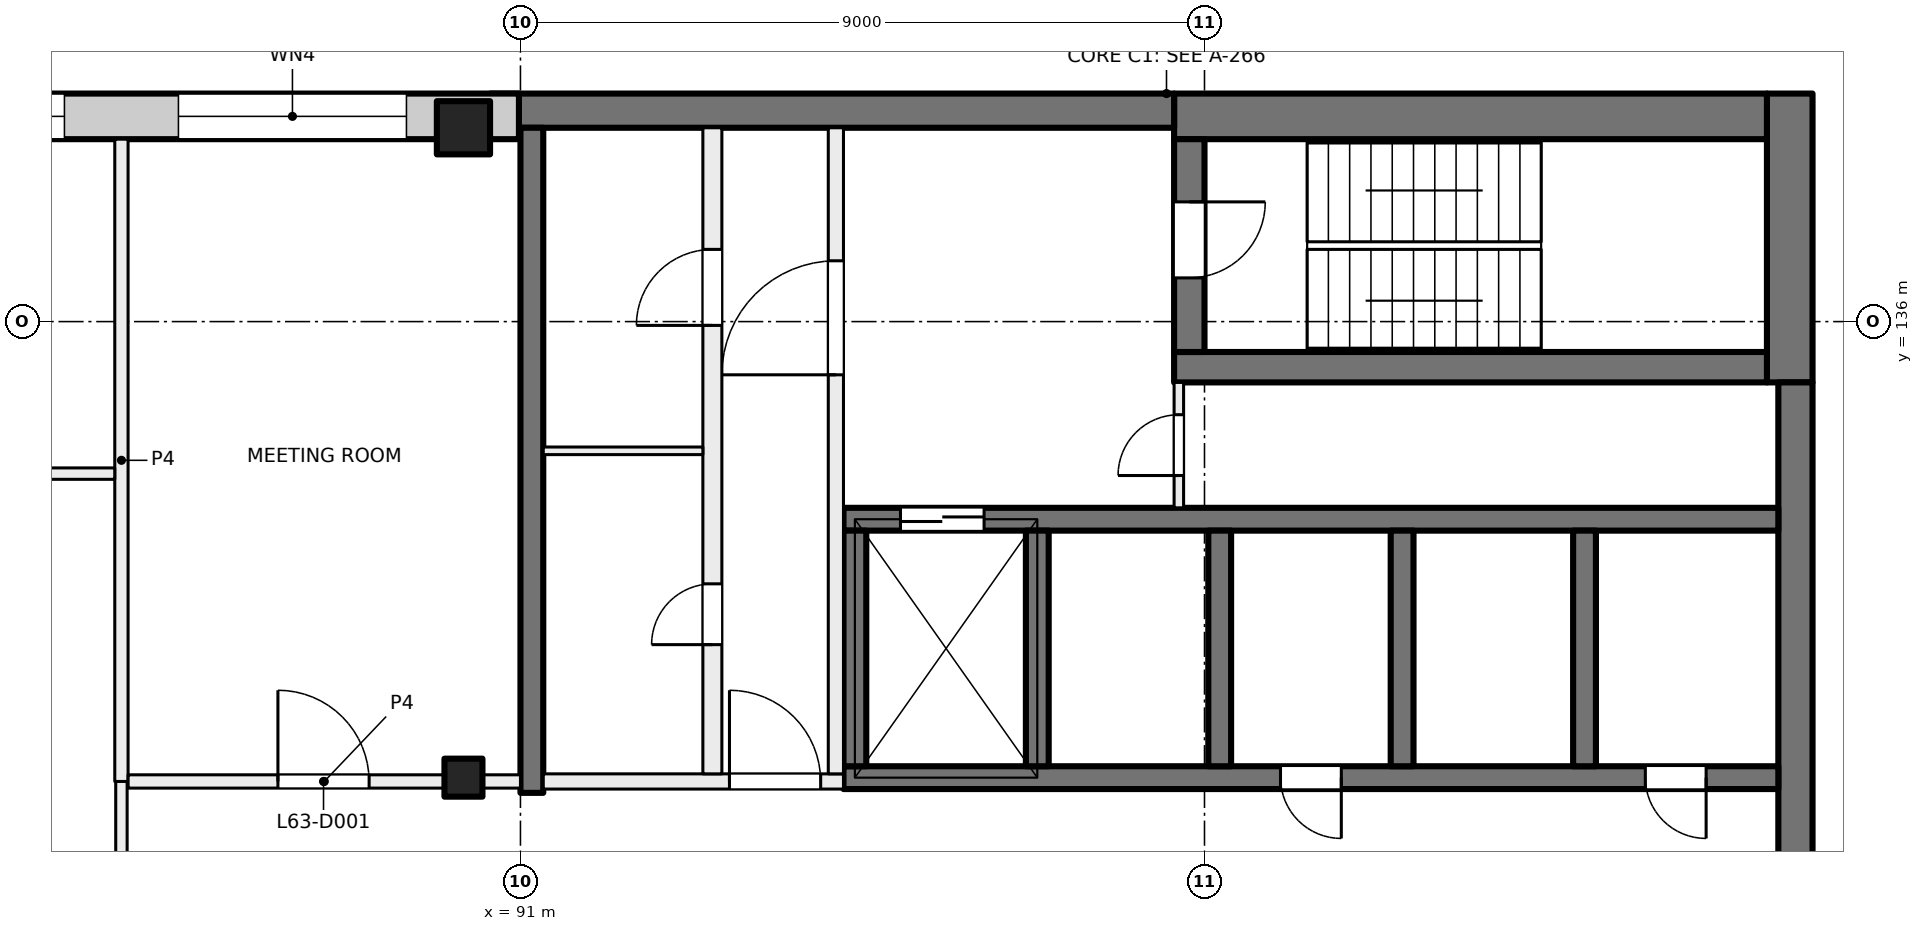
"""IFC4 building model, lengths in metres.
Left out: names, types, materials, properties, quantities, classifications, styles, units other than length and angle.
Written with IfcOpenShell. Run it as: python <this file> out.ifc"""

import sys

from ifc_helpers import new_model, si_unit, direction, frame, frame_2d, origin, origin_2d, place, context, subcontext, project, spatial, rectangle, extrude, element, fill, save


model = new_model("IFC4")
c1 = context("Model", 3, precision=1e-05, world=origin(), true_north=direction((0.0, 1.0)))
c2 = subcontext(c1, "Body", "Model", "MODEL_VIEW")
j1 = project(units=[si_unit("LENGTHUNIT", "METRE"), si_unit("PLANEANGLEUNIT", "RADIAN")], contexts=[c1])
p1 = place(None, origin())
s1 = spatial("IfcSite", under=j1, at=p1, CompositionType="ELEMENT")
p2 = place(p1, origin())
s2 = spatial("IfcBuilding", under=s1, at=p2, CompositionType="ELEMENT")
p3 = place(p2, frame((0.0, 0.0, 265.5)))
s3 = spatial("IfcBuildingStorey", under=s2, at=p3, CompositionType="ELEMENT", Elevation=265.5)
p4 = place(p3, frame((90.25, 130.0, 0.0), z_axis=(0.0, 0.0, 1.0), x_axis=(1.0, 0.0, 0.0)))
e1 = element("IfcColumn", 1, at=p4, inside=s3, PredefinedType="COLUMN", context=c2, shape_type="SweptSolid", body=[
    extrude(rectangle(XDim=0.5, YDim=0.5, at=origin_2d()), origin(), (0.0, 0.0, 1.0), 4.0),
])
p5 = place(p3, frame((90.25, 138.55, 0.0), z_axis=(0.0, 0.0, 1.0), x_axis=(1.0, 0.0, 0.0)))
e2 = element("IfcColumn", 2, at=p5, inside=s3, PredefinedType="COLUMN", context=c2, shape_type="SweptSolid", body=[
    extrude(rectangle(XDim=0.7, YDim=0.7, at=origin_2d()), origin(), (0.0, 0.0, 1.0), 4.0),
])
p6 = place(p3, frame((107.7, 139.0, 0.0), z_axis=(0.0, 0.0, 1.0), x_axis=(0.0, -1.0, 0.0)))
e3 = element("IfcWall", 3, at=p6, inside=s3, PredefinedType="SHEAR", context=c2, shape_type="SweptSolid", body=[
    extrude(rectangle(XDim=3.8, YDim=0.6, at=frame_2d((1.9, 0.0))), origin(), (0.0, 0.0, 1.0), 4.0),
])
p7 = place(p3, frame((107.775, 135.2, 0.0), z_axis=(0.0, 0.0, 1.0), x_axis=(0.0, -1.0, 0.0)))
e4 = element("IfcWall", 4, at=p7, inside=s3, PredefinedType="SHEAR", context=c2, shape_type="SweptSolid", body=[
    extrude(rectangle(XDim=14.4, YDim=0.45, at=frame_2d((7.2, 0.0))), origin(), (0.0, 0.0, 1.0), 4.0),
])
p8 = place(p3, frame((107.4, 138.7, 0.0), z_axis=(0.0, 0.0, 1.0), x_axis=(-1.0, 0.0, 0.0)))
e5 = element("IfcWall", 5, at=p8, inside=s3, PredefinedType="SHEAR", context=c2, shape_type="SweptSolid", body=[
    extrude(rectangle(XDim=7.8, YDim=0.6, at=frame_2d((3.9, 0.0))), origin(), (0.0, 0.0, 1.0), 4.0),
])
p9 = place(p3, frame((99.6, 138.775, 0.0), z_axis=(0.0, 0.0, 1.0), x_axis=(-1.0, 0.0, 0.0)))
e6 = element("IfcWall", 6, at=p9, inside=s3, PredefinedType="SHEAR", context=c2, shape_type="SweptSolid", body=[
    extrude(rectangle(XDim=9.0, YDim=0.45, at=frame_2d((4.5, 0.0))), origin(), (0.0, 0.0, 1.0), 4.0),
])
p10 = place(p3, frame((107.4, 135.4, 0.0), z_axis=(0.0, 0.0, 1.0), x_axis=(-1.0, 0.0, 0.0)))
e7 = element("IfcWall", 7, at=p10, inside=s3, PredefinedType="SHEAR", context=c2, shape_type="SweptSolid", body=[
    extrude(rectangle(XDim=7.8, YDim=0.4, at=frame_2d((3.9, 0.0))), origin(), (0.0, 0.0, 1.0), 4.0),
])
p11 = place(p3, frame((99.8, 138.4, 0.0), z_axis=(0.0, 0.0, 1.0), x_axis=(0.0, -1.0, 0.0)))
e8 = element("IfcWall", 8, at=p11, inside=s3, PredefinedType="SHEAR", context=c2, shape_type="SweptSolid", body=[
    extrude(rectangle(XDim=2.8, YDim=0.4, at=frame_2d((1.4, 0.0))), origin(), (0.0, 0.0, 1.0), 4.0),
])
p12 = place(p11, frame((0.825, 0.0, 0.0)))
e9 = element("IfcOpeningElement", 9, at=p12, cuts=e8, PredefinedType="OPENING", context=c2, shape_type="SweptSolid", body=[
    extrude(rectangle(XDim=1.0, YDim=2.1, at=frame_2d((0.5, 1.05))), frame((0.0, 0.21, 0.0), z_axis=(0.0, -1.0, 0.0), x_axis=(1.0, 0.0, 0.0)), (0.0, 0.0, 1.0), 0.42),
])
p13 = place(p3, frame((107.55, 130.0, 0.0), z_axis=(0.0, 0.0, 1.0), x_axis=(-1.0, 0.0, 0.0)))
e10 = element("IfcWall", 10, at=p13, inside=s3, PredefinedType="SHEAR", context=c2, shape_type="SweptSolid", body=[
    extrude(rectangle(XDim=12.3, YDim=0.3, at=frame_2d((6.15, 0.0))), origin(), (0.0, 0.0, 1.0), 4.0),
])
p14 = place(p13, frame((0.95, 0.0, 0.0)))
e11 = element("IfcOpeningElement", 11, at=p14, cuts=e10, PredefinedType="OPENING", context=c2, shape_type="SweptSolid", body=[
    extrude(rectangle(XDim=0.8, YDim=2.1, at=frame_2d((0.4, 1.05))), frame((0.0, 0.16, 0.0), z_axis=(0.0, -1.0, 0.0), x_axis=(1.0, 0.0, 0.0)), (0.0, 0.0, 1.0), 0.32),
])
p15 = place(p13, frame((5.75, 0.0, 0.0)))
e12 = element("IfcOpeningElement", 12, at=p15, cuts=e10, PredefinedType="OPENING", context=c2, shape_type="SweptSolid", body=[
    extrude(rectangle(XDim=0.8, YDim=2.1, at=frame_2d((0.4, 1.05))), frame((0.0, 0.16, 0.0), z_axis=(0.0, -1.0, 0.0), x_axis=(1.0, 0.0, 0.0)), (0.0, 0.0, 1.0), 0.32),
])
p16 = place(p3, frame((107.55, 133.4, 0.0), z_axis=(0.0, 0.0, 1.0), x_axis=(-1.0, 0.0, 0.0)))
e13 = element("IfcWall", 13, at=p16, inside=s3, PredefinedType="SHEAR", context=c2, shape_type="SweptSolid", body=[
    extrude(rectangle(XDim=12.3, YDim=0.3, at=frame_2d((6.15, 0.0))), origin(), (0.0, 0.0, 1.0), 4.0),
])
p17 = place(p16, frame((10.45, 0.0, 0.0)))
e14 = element("IfcOpeningElement", 14, at=p17, cuts=e13, PredefinedType="OPENING", context=c2, shape_type="SweptSolid", body=[
    extrude(rectangle(XDim=1.1, YDim=2.1, at=frame_2d((0.55, 1.05))), frame((0.0, 0.16, 0.0), z_axis=(0.0, -1.0, 0.0), x_axis=(1.0, 0.0, 0.0)), (0.0, 0.0, 1.0), 0.32),
])
for number, where, z_axis, x_axis in (
    (15, (105.0, 133.25, 0.0), (0.0, 0.0, 1.0), (0.0, -1.0, 0.0)),
    (16, (102.6, 133.25, 0.0), (0.0, 0.0, 1.0), (0.0, -1.0, 0.0)),
    (17, (100.2, 133.25, 0.0), (0.0, 0.0, 1.0), (0.0, -1.0, 0.0)),
    (18, (97.8, 133.25, 0.0), (0.0, 0.0, 1.0), (0.0, -1.0, 0.0)),
    (19, (95.4, 133.25, 0.0), (0.0, 0.0, 1.0), (0.0, -1.0, 0.0)),
):
    element("IfcWall", number, at=place(p3, frame(where, z_axis=z_axis, x_axis=x_axis)), inside=s3, PredefinedType="SHEAR", context=c2, shape_type="SweptSolid", body=[
        extrude(rectangle(XDim=3.1, YDim=0.3, at=frame_2d((1.55, 0.0))), origin(), (0.0, 0.0, 1.0), 4.0),
    ])
p18 = place(p3, frame((91.15, 138.55, 0.0), z_axis=(0.0, 0.0, 1.0), x_axis=(0.0, -1.0, 0.0)))
e20 = element("IfcWall", 20, at=p18, inside=s3, PredefinedType="SHEAR", context=c2, shape_type="SweptSolid", body=[
    extrude(rectangle(XDim=8.75, YDim=0.3, at=frame_2d((4.375, 0.0))), origin(), (0.0, 0.0, 1.0), 4.0),
])
p19 = place(p3, frame((47.07, 138.7, 0.0), z_axis=(0.0, 0.0, 1.0), x_axis=(1.0, 0.0, 0.0)))
e21 = element("IfcWall", 21, at=p19, inside=s3, PredefinedType="SOLIDWALL", context=c2, shape_type="SweptSolid", body=[
    extrude(rectangle(XDim=43.91, YDim=0.6, at=frame_2d((21.955, 0.0))), origin(), (0.0, 0.0, 1.0), 3.625),
])
p20 = place(p19, frame((4.03, 0.0, 0.0)))
e22 = element("IfcOpeningElement", 22, at=p20, cuts=e21, PredefinedType="OPENING", context=c2, shape_type="SweptSolid", body=[
    extrude(rectangle(XDim=1.8, YDim=2.4, at=frame_2d((0.9, 1.2))), frame((0.0, 0.31, 0.0), z_axis=(0.0, -1.0, 0.0), x_axis=(1.0, 0.0, 0.0)), (0.0, 0.0, 1.0), 0.62),
])
p21 = place(p19, frame((7.93, 0.0, 0.9)))
e23 = element("IfcOpeningElement", 23, at=p21, cuts=e21, PredefinedType="OPENING", context=c2, shape_type="SweptSolid", body=[
    extrude(rectangle(XDim=3.0, YDim=2.4, at=frame_2d((1.5, 1.2))), frame((0.0, 0.31, 0.0), z_axis=(0.0, -1.0, 0.0), x_axis=(1.0, 0.0, 0.0)), (0.0, 0.0, 1.0), 0.62),
])
p22 = place(p19, frame((12.43, 0.0, 0.9)))
e24 = element("IfcOpeningElement", 24, at=p22, cuts=e21, PredefinedType="OPENING", context=c2, shape_type="SweptSolid", body=[
    extrude(rectangle(XDim=3.0, YDim=2.4, at=frame_2d((1.5, 1.2))), frame((0.0, 0.31, 0.0), z_axis=(0.0, -1.0, 0.0), x_axis=(1.0, 0.0, 0.0)), (0.0, 0.0, 1.0), 0.62),
])
p23 = place(p19, frame((17.53, 0.0, 0.0)))
e25 = element("IfcOpeningElement", 25, at=p23, cuts=e21, PredefinedType="OPENING", context=c2, shape_type="SweptSolid", body=[
    extrude(rectangle(XDim=1.8, YDim=2.4, at=frame_2d((0.9, 1.2))), frame((0.0, 0.31, 0.0), z_axis=(0.0, -1.0, 0.0), x_axis=(1.0, 0.0, 0.0)), (0.0, 0.0, 1.0), 0.62),
])
p24 = place(p19, frame((21.43, 0.0, 0.9)))
e26 = element("IfcOpeningElement", 26, at=p24, cuts=e21, PredefinedType="OPENING", context=c2, shape_type="SweptSolid", body=[
    extrude(rectangle(XDim=3.0, YDim=2.4, at=frame_2d((1.5, 1.2))), frame((0.0, 0.31, 0.0), z_axis=(0.0, -1.0, 0.0), x_axis=(1.0, 0.0, 0.0)), (0.0, 0.0, 1.0), 0.62),
])
p25 = place(p19, frame((25.93, 0.0, 0.9)))
e27 = element("IfcOpeningElement", 27, at=p25, cuts=e21, PredefinedType="OPENING", context=c2, shape_type="SweptSolid", body=[
    extrude(rectangle(XDim=3.0, YDim=2.4, at=frame_2d((1.5, 1.2))), frame((0.0, 0.31, 0.0), z_axis=(0.0, -1.0, 0.0), x_axis=(1.0, 0.0, 0.0)), (0.0, 0.0, 1.0), 0.62),
])
p26 = place(p19, frame((30.43, 0.0, 0.9)))
e28 = element("IfcOpeningElement", 28, at=p26, cuts=e21, PredefinedType="OPENING", context=c2, shape_type="SweptSolid", body=[
    extrude(rectangle(XDim=3.0, YDim=2.4, at=frame_2d((1.5, 1.2))), frame((0.0, 0.31, 0.0), z_axis=(0.0, -1.0, 0.0), x_axis=(1.0, 0.0, 0.0)), (0.0, 0.0, 1.0), 0.62),
])
p27 = place(p19, frame((34.93, 0.0, 0.9)))
e29 = element("IfcOpeningElement", 29, at=p27, cuts=e21, PredefinedType="OPENING", context=c2, shape_type="SweptSolid", body=[
    extrude(rectangle(XDim=3.0, YDim=2.4, at=frame_2d((1.5, 1.2))), frame((0.0, 0.31, 0.0), z_axis=(0.0, -1.0, 0.0), x_axis=(1.0, 0.0, 0.0)), (0.0, 0.0, 1.0), 0.62),
])
p28 = place(p19, frame((39.43, 0.0, 0.9)))
e30 = element("IfcOpeningElement", 30, at=p28, cuts=e21, PredefinedType="OPENING", context=c2, shape_type="SweptSolid", body=[
    extrude(rectangle(XDim=3.0, YDim=2.4, at=frame_2d((1.5, 1.2))), frame((0.0, 0.31, 0.0), z_axis=(0.0, -1.0, 0.0), x_axis=(1.0, 0.0, 0.0)), (0.0, 0.0, 1.0), 0.62),
])
p29 = place(p3, frame((91.3, 129.95, 0.0), z_axis=(0.0, 0.0, 1.0), x_axis=(1.0, 0.0, 0.0)))
e31 = element("IfcWall", 31, at=p29, inside=s3, PredefinedType="PARTITIONING", context=c2, shape_type="SweptSolid", body=[
    extrude(rectangle(XDim=3.95, YDim=0.2, at=frame_2d((1.975, 0.0))), origin(), (0.0, 0.0, 1.0), 3.625),
])
p30 = place(p29, frame((2.45, 0.0, 0.0)))
e32 = element("IfcOpeningElement", 32, at=p30, cuts=e31, PredefinedType="OPENING", context=c2, shape_type="SweptSolid", body=[
    extrude(rectangle(XDim=1.2, YDim=2.1, at=frame_2d((0.6, 1.05))), frame((0.0, 0.11, 0.0), z_axis=(0.0, -1.0, 0.0), x_axis=(1.0, 0.0, 0.0)), (0.0, 0.0, 1.0), 0.22),
])
p31 = place(p3, frame((95.15, 130.05, 0.0), z_axis=(0.0, 0.0, 1.0), x_axis=(0.0, 1.0, 0.0)))
e33 = element("IfcWall", 33, at=p31, inside=s3, PredefinedType="PARTITIONING", context=c2, shape_type="SweptSolid", body=[
    extrude(rectangle(XDim=8.5, YDim=0.2, at=frame_2d((4.25, 0.0))), origin(), (0.0, 0.0, 1.0), 3.625),
])
p32 = place(p31, frame((5.25, 0.0, 0.0)))
e34 = element("IfcOpeningElement", 34, at=p32, cuts=e33, PredefinedType="OPENING", context=c2, shape_type="SweptSolid", body=[
    extrude(rectangle(XDim=1.5, YDim=2.1, at=frame_2d((0.75, 1.05))), frame((0.0, 0.11, 0.0), z_axis=(0.0, -1.0, 0.0), x_axis=(1.0, 0.0, 0.0)), (0.0, 0.0, 1.0), 0.22),
])
p33 = place(p3, frame((93.525, 130.05, 0.0), z_axis=(0.0, 0.0, 1.0), x_axis=(0.0, 1.0, 0.0)))
e35 = element("IfcWall", 35, at=p33, inside=s3, PredefinedType="PARTITIONING", context=c2, shape_type="SweptSolid", body=[
    extrude(rectangle(XDim=8.5, YDim=0.25, at=frame_2d((4.25, 0.0))), origin(), (0.0, 0.0, 1.0), 3.625),
])
p34 = place(p33, frame((1.7, 0.0, 0.0)))
e36 = element("IfcOpeningElement", 36, at=p34, cuts=e35, PredefinedType="OPENING", context=c2, shape_type="SweptSolid", body=[
    extrude(rectangle(XDim=0.8, YDim=2.1, at=frame_2d((0.4, 1.05))), frame((0.0, 0.135, 0.0), z_axis=(0.0, -1.0, 0.0), x_axis=(1.0, 0.0, 0.0)), (0.0, 0.0, 1.0), 0.27),
])
p35 = place(p33, frame((5.9, 0.0, 0.0)))
e37 = element("IfcOpeningElement", 37, at=p35, cuts=e35, PredefinedType="OPENING", context=c2, shape_type="SweptSolid", body=[
    extrude(rectangle(XDim=1.0, YDim=2.1, at=frame_2d((0.5, 1.05))), frame((0.0, 0.135, 0.0), z_axis=(0.0, -1.0, 0.0), x_axis=(1.0, 0.0, 0.0)), (0.0, 0.0, 1.0), 0.27),
])
p36 = place(p3, frame((99.663, 133.55, 0.0), z_axis=(0.0, 0.0, 1.0), x_axis=(0.0, 1.0, 0.0)))
e38 = element("IfcWall", 38, at=p36, inside=s3, PredefinedType="PARTITIONING", context=c2, shape_type="SweptSolid", body=[
    extrude(rectangle(XDim=1.65, YDim=0.125, at=frame_2d((0.825, 0.0))), origin(), (0.0, 0.0, 1.0), 3.625),
])
p37 = place(p36, frame((0.425, 0.0, 0.0)))
e39 = element("IfcOpeningElement", 39, at=p37, cuts=e38, PredefinedType="OPENING", context=c2, shape_type="SweptSolid", body=[
    extrude(rectangle(XDim=0.8, YDim=2.1, at=frame_2d((0.4, 1.05))), frame((0.0, 0.073, 0.0), z_axis=(0.0, -1.0, 0.0), x_axis=(1.0, 0.0, 0.0)), (0.0, 0.0, 1.0), 0.145),
])
p38 = place(p3, frame((91.3, 134.3, 0.0), z_axis=(0.0, 0.0, 1.0), x_axis=(1.0, 0.0, 0.0)))
e40 = element("IfcWall", 40, at=p38, inside=s3, PredefinedType="PARTITIONING", context=c2, shape_type="SweptSolid", body=[
    extrude(rectangle(XDim=2.1, YDim=0.1, at=frame_2d((1.05, 0.0))), origin(), (0.0, 0.0, 1.0), 3.625),
])
p39 = place(p3, frame((85.75, 126.06, 0.0), z_axis=(0.0, 0.0, 1.0), x_axis=(0.0, 1.0, 0.0)))
e41 = element("IfcWall", 41, at=p39, inside=s3, PredefinedType="PARTITIONING", context=c2, shape_type="SweptSolid", body=[
    extrude(rectangle(XDim=3.89, YDim=0.15, at=frame_2d((1.945, 0.0))), origin(), (0.0, 0.0, 1.0), 3.625),
])
p40 = place(p3, frame((85.75, 129.95, 0.0), z_axis=(0.0, 0.0, 1.0), x_axis=(0.0, 1.0, 0.0)))
e42 = element("IfcWall", 42, at=p40, inside=s3, PredefinedType="PARTITIONING", context=c2, shape_type="SweptSolid", body=[
    extrude(rectangle(XDim=8.45, YDim=0.175, at=frame_2d((4.225, 0.0))), origin(), (0.0, 0.0, 1.0), 3.625),
])
p41 = place(p3, frame((85.662, 134.0, 0.0), z_axis=(0.0, 0.0, 1.0), x_axis=(-1.0, 0.0, 0.0)))
e43 = element("IfcWall", 43, at=p41, inside=s3, PredefinedType="PARTITIONING", context=c2, shape_type="SweptSolid", body=[
    extrude(rectangle(XDim=4.487, YDim=0.15, at=frame_2d((2.244, 0.0))), origin(), (0.0, 0.0, 1.0), 3.625),
])
p42 = place(p41, frame((1.696, 0.0, 0.0)))
e44 = element("IfcOpeningElement", 44, at=p42, cuts=e43, PredefinedType="OPENING", context=c2, shape_type="SweptSolid", body=[
    extrude(rectangle(XDim=1.0, YDim=2.1, at=frame_2d((0.5, 1.05))), frame((0.0, 0.085, 0.0), z_axis=(0.0, -1.0, 0.0), x_axis=(1.0, 0.0, 0.0)), (0.0, 0.0, 1.0), 0.17),
])
p43 = place(p3, frame((85.838, 129.95, 0.0), z_axis=(0.0, 0.0, 1.0), x_axis=(1.0, 0.0, 0.0)))
e45 = element("IfcWall", 45, at=p43, inside=s3, PredefinedType="PARTITIONING", context=c2, shape_type="SweptSolid", body=[
    extrude(rectangle(XDim=5.162, YDim=0.175, at=frame_2d((2.581, 0.0))), origin(), (0.0, 0.0, 1.0), 3.625),
])
p44 = place(p43, frame((1.971, 0.0, 0.0)))
e46 = element("IfcOpeningElement", 46, at=p44, cuts=e45, PredefinedType="OPENING", context=c2, shape_type="SweptSolid", body=[
    extrude(rectangle(XDim=1.2, YDim=2.1, at=frame_2d((0.6, 1.05))), frame((0.0, 0.097, 0.0), z_axis=(0.0, -1.0, 0.0), x_axis=(1.0, 0.0, 0.0)), (0.0, 0.0, 1.0), 0.195),
])
p45 = place(p27, origin())
e47 = element("IfcWindow", 47, at=p45, inside=s3, PartitioningType="SINGLE_PANEL", PredefinedType="WINDOW", context=c2, shape_type="SweptSolid", body=[
    extrude(rectangle(XDim=3.0, YDim=2.4, at=frame_2d((1.5, 1.2))), frame((0.0, 0.03, 0.0), z_axis=(0.0, -1.0, 0.0), x_axis=(1.0, 0.0, 0.0)), (0.0, 0.0, 1.0), 0.06),
])
fill(e29, e47)
p46 = place(p28, origin())
e48 = element("IfcWindow", 48, at=p46, inside=s3, PartitioningType="SINGLE_PANEL", PredefinedType="WINDOW", context=c2, shape_type="SweptSolid", body=[
    extrude(rectangle(XDim=3.0, YDim=2.4, at=frame_2d((1.5, 1.2))), frame((0.0, 0.03, 0.0), z_axis=(0.0, -1.0, 0.0), x_axis=(1.0, 0.0, 0.0)), (0.0, 0.0, 1.0), 0.06),
])
fill(e30, e48)
p47 = place(p14, origin())
e49 = element("IfcDoor", 49, at=p47, inside=s3, OperationType="SINGLE_SWING_LEFT", PredefinedType="DOOR", context=c2, shape_type="SweptSolid", body=[
    extrude(rectangle(XDim=0.8, YDim=2.1, at=frame_2d((0.4, 1.05))), frame((0.0, 0.025, 0.0), z_axis=(0.0, -1.0, 0.0), x_axis=(1.0, 0.0, 0.0)), (0.0, 0.0, 1.0), 0.05),
])
fill(e11, e49)
p48 = place(p15, origin())
e50 = element("IfcDoor", 50, at=p48, inside=s3, OperationType="SINGLE_SWING_RIGHT", PredefinedType="DOOR", context=c2, shape_type="SweptSolid", body=[
    extrude(rectangle(XDim=0.8, YDim=2.1, at=frame_2d((0.4, 1.05))), frame((0.0, 0.025, 0.0), z_axis=(0.0, -1.0, 0.0), x_axis=(1.0, 0.0, 0.0)), (0.0, 0.0, 1.0), 0.05),
])
fill(e12, e50)
p49 = place(p30, origin())
e51 = element("IfcDoor", 51, at=p49, inside=s3, OperationType="DOUBLE_DOOR_SINGLE_SWING", PredefinedType="DOOR", context=c2, shape_type="SweptSolid", body=[
    extrude(rectangle(XDim=1.2, YDim=2.1, at=frame_2d((0.6, 1.05))), frame((0.0, 0.025, 0.0), z_axis=(0.0, -1.0, 0.0), x_axis=(1.0, 0.0, 0.0)), (0.0, 0.0, 1.0), 0.05),
])
fill(e32, e51)
p50 = place(p32, origin())
e52 = element("IfcDoor", 52, at=p50, inside=s3, OperationType="DOUBLE_DOOR_SINGLE_SWING", PredefinedType="DOOR", context=c2, shape_type="SweptSolid", body=[
    extrude(rectangle(XDim=1.5, YDim=2.1, at=frame_2d((0.75, 1.05))), frame((0.0, 0.025, 0.0), z_axis=(0.0, -1.0, 0.0), x_axis=(1.0, 0.0, 0.0)), (0.0, 0.0, 1.0), 0.05),
])
fill(e34, e52)
p51 = place(p12, origin())
e53 = element("IfcDoor", 53, at=p51, inside=s3, OperationType="SINGLE_SWING_RIGHT", PredefinedType="DOOR", context=c2, shape_type="SweptSolid", body=[
    extrude(rectangle(XDim=1.0, YDim=2.1, at=frame_2d((0.5, 1.05))), frame((0.0, 0.025, 0.0), z_axis=(0.0, -1.0, 0.0), x_axis=(1.0, 0.0, 0.0)), (0.0, 0.0, 1.0), 0.05),
])
fill(e9, e53)
p52 = place(p37, origin())
e54 = element("IfcDoor", 54, at=p52, inside=s3, OperationType="SINGLE_SWING_LEFT", PredefinedType="DOOR", context=c2, shape_type="SweptSolid", body=[
    extrude(rectangle(XDim=0.8, YDim=2.1, at=frame_2d((0.4, 1.05))), frame((0.0, 0.025, 0.0), z_axis=(0.0, -1.0, 0.0), x_axis=(1.0, 0.0, 0.0)), (0.0, 0.0, 1.0), 0.05),
])
fill(e39, e54)
p53 = place(p34, origin())
e55 = element("IfcDoor", 55, at=p53, inside=s3, OperationType="SINGLE_SWING_RIGHT", PredefinedType="DOOR", context=c2, shape_type="SweptSolid", body=[
    extrude(rectangle(XDim=0.8, YDim=2.1, at=frame_2d((0.4, 1.05))), frame((0.0, 0.025, 0.0), z_axis=(0.0, -1.0, 0.0), x_axis=(1.0, 0.0, 0.0)), (0.0, 0.0, 1.0), 0.05),
])
fill(e36, e55)
p54 = place(p35, origin())
e56 = element("IfcDoor", 56, at=p54, inside=s3, OperationType="SINGLE_SWING_LEFT", PredefinedType="DOOR", context=c2, shape_type="SweptSolid", body=[
    extrude(rectangle(XDim=1.0, YDim=2.1, at=frame_2d((0.5, 1.05))), frame((0.0, 0.025, 0.0), z_axis=(0.0, -1.0, 0.0), x_axis=(1.0, 0.0, 0.0)), (0.0, 0.0, 1.0), 0.05),
])
fill(e37, e56)
p55 = place(p17, origin())
e57 = element("IfcDoor", 57, at=p55, inside=s3, OperationType="DOUBLE_DOOR_SLIDING", PredefinedType="DOOR", context=c2, shape_type="SweptSolid", body=[
    extrude(rectangle(XDim=1.1, YDim=2.1, at=frame_2d((0.55, 1.05))), frame((0.0, 0.025, 0.0), z_axis=(0.0, -1.0, 0.0), x_axis=(1.0, 0.0, 0.0)), (0.0, 0.0, 1.0), 0.05),
])
fill(e14, e57)
p56 = place(p44, origin())
e58 = element("IfcDoor", 58, at=p56, inside=s3, OperationType="DOUBLE_DOOR_SINGLE_SWING", PredefinedType="DOOR", context=c2, shape_type="SweptSolid", body=[
    extrude(rectangle(XDim=1.2, YDim=2.1, at=frame_2d((0.6, 1.05))), frame((0.0, 0.025, 0.0), z_axis=(0.0, -1.0, 0.0), x_axis=(1.0, 0.0, 0.0)), (0.0, 0.0, 1.0), 0.05),
])
fill(e46, e58)
save(model, sys.argv[1])
